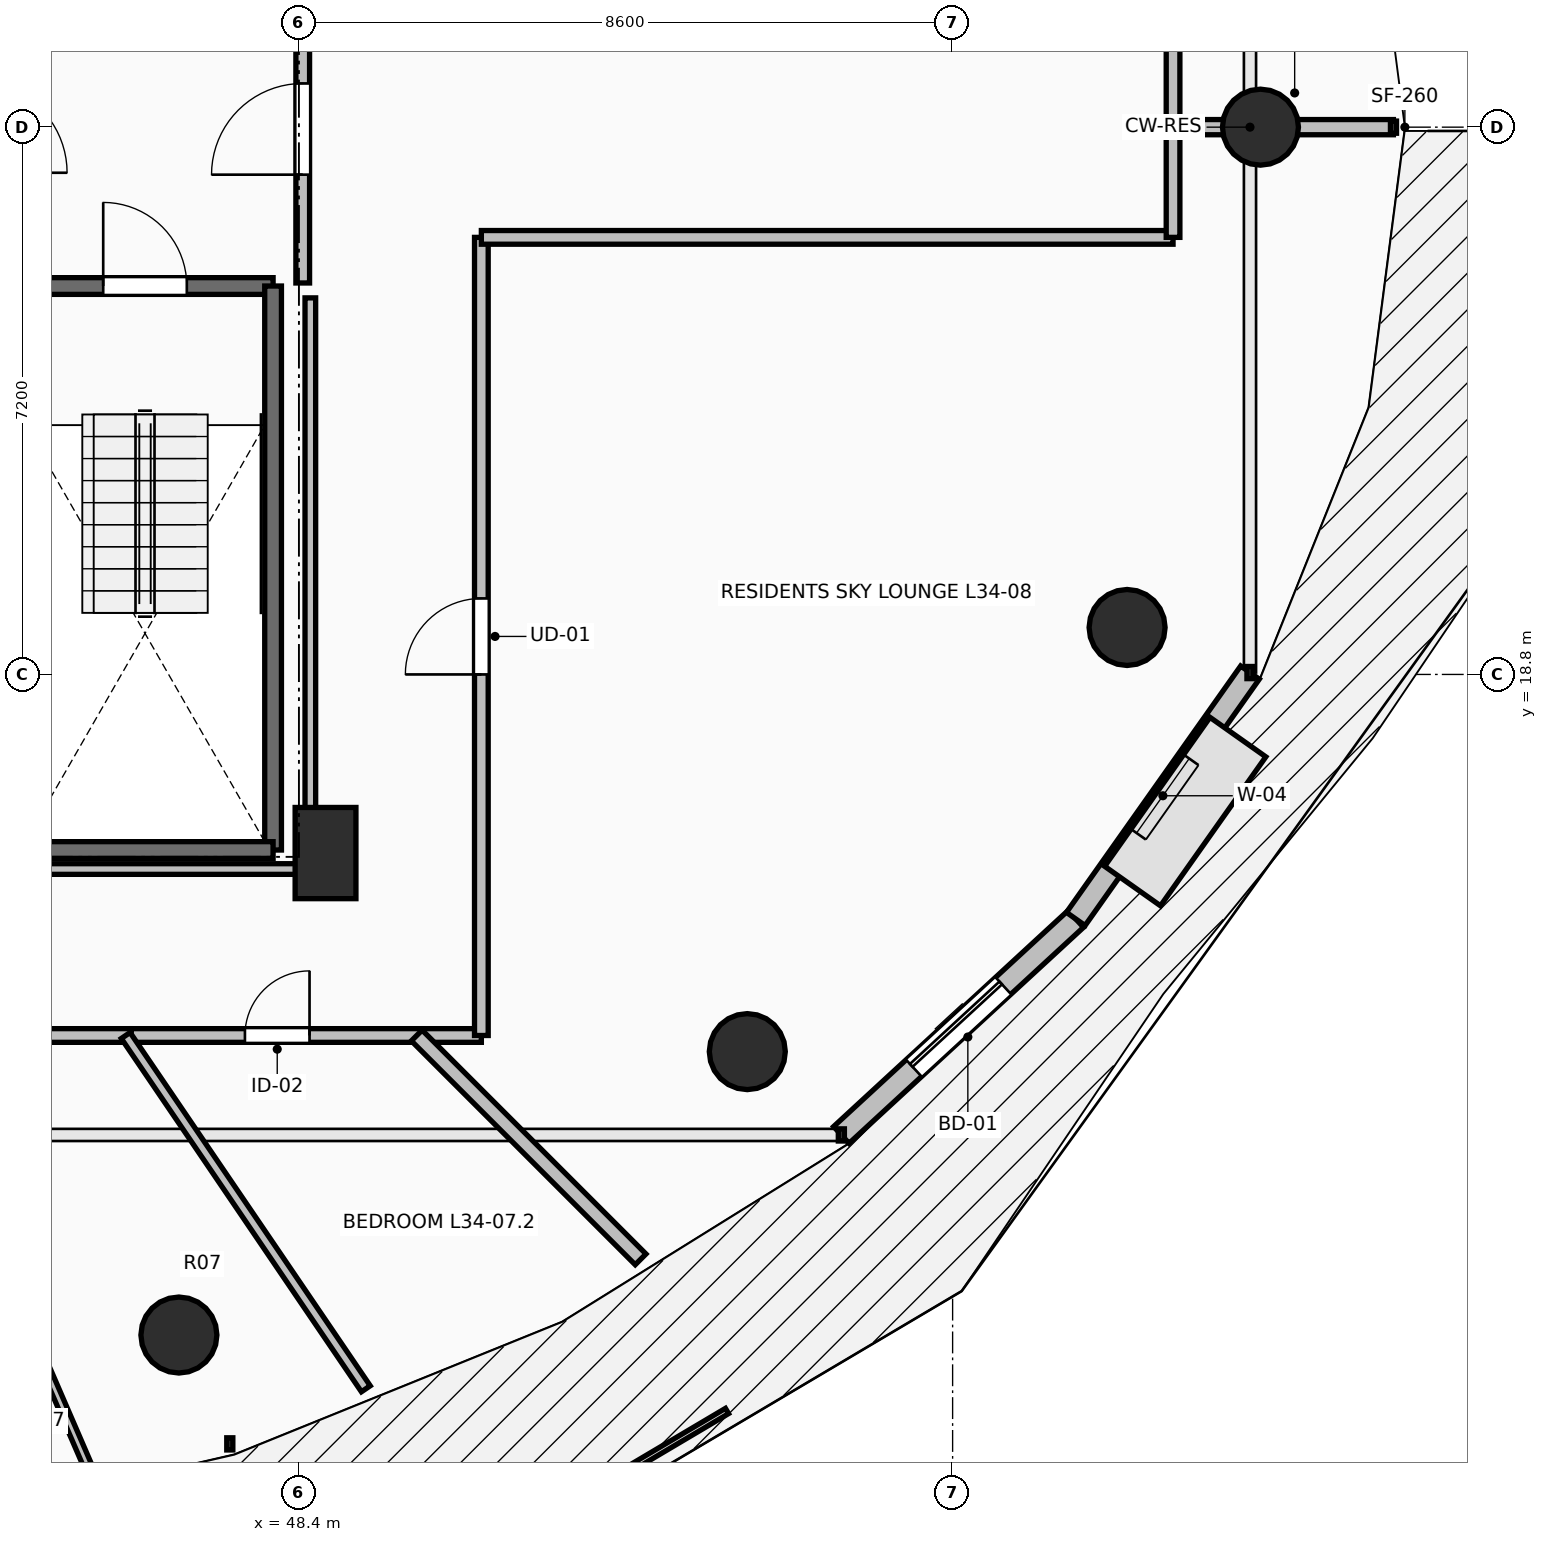
"""IFC4 building model, lengths in metres.
Left out: names, types, materials, properties, quantities, classifications, styles, units other than length and angle.
Written with IfcOpenShell. Run it as: python <this file> out.ifc"""

import sys

from ifc_helpers import new_model, si_unit, direction, frame, frame_2d, origin, origin_2d, place, context, subcontext, project, spatial, rectangle, circle, extrude, element, fill, save


model = new_model("IFC4")
c1 = context("Model", 3, precision=1e-05, world=origin(), true_north=direction((0.0, 1.0)))
c2 = subcontext(c1, "Body", "Model", "MODEL_VIEW")
j1 = project(units=[si_unit("LENGTHUNIT", "METRE"), si_unit("PLANEANGLEUNIT", "RADIAN")], contexts=[c1])
p1 = place(None, origin())
s1 = spatial("IfcSite", under=j1, at=p1, CompositionType="ELEMENT")
p2 = place(p1, origin())
s2 = spatial("IfcBuilding", under=s1, at=p2, CompositionType="ELEMENT")
p3 = place(p2, frame((0.0, 0.0, 129.1)))
s3 = spatial("IfcBuildingStorey", under=s2, at=p3, CompositionType="ELEMENT", Elevation=129.1)
for number, where, z_axis, x_axis in (
    (1, (61.05, 26.0, 0.0), (0.0, 0.0, 1.0), (1.0, 0.0, 0.0)),
    (2, (46.821, 10.109, 0.0), (0.0, 0.0, 1.0), (0.383, -0.924, 0.0)),
    (3, (54.299, 13.838, 0.0), (0.0, 0.0, 1.0), (0.707, -0.707, 0.0)),
    (4, (59.295, 19.418, 0.0), (0.0, 0.0, 1.0), (0.924, -0.383, 0.0)),
):
    element("IfcColumn", number, at=place(p3, frame(where, z_axis=z_axis, x_axis=x_axis)), inside=s3, PredefinedType="COLUMN", context=c2, shape_type="SweptSolid", body=[
        extrude(circle(Radius=0.5, at=origin_2d()), origin(), (0.0, 0.0, 1.0), 3.5),
    ])
p4 = place(p3, frame((48.75, 16.45, 0.0), z_axis=(0.0, 0.0, 1.0), x_axis=(1.0, 0.0, 0.0)))
e5 = element("IfcColumn", 5, at=p4, inside=s3, PredefinedType="PILASTER", context=c2, shape_type="SweptSolid", body=[
    extrude(rectangle(XDim=0.8, YDim=1.2, at=origin_2d()), origin(), (0.0, 0.0, 1.0), 3.5),
])
p5 = place(p3, frame((55.536, 12.742, 0.0), z_axis=(0.0, 0.0, 1.0), x_axis=(0.735477154165, 0.677549522693, 0.0)))
e6 = element("IfcWall", 6, at=p5, inside=s3, PredefinedType="STANDARD", context=c2, shape_type="SweptSolid", body=[
    extrude(rectangle(XDim=4.194, YDim=0.3, at=frame_2d((2.097, 0.0))), origin(), (0.0, 0.0, 1.0), 3.24),
])
p6 = place(p5, frame((1.297, 0.0, 0.0)))
e7 = element("IfcOpeningElement", 7, at=p6, cuts=e6, PredefinedType="OPENING", context=c2, shape_type="SweptSolid", body=[
    extrude(rectangle(XDim=1.6, YDim=2.3, at=frame_2d((0.8, 1.15))), frame((0.0, 0.165, 0.0), z_axis=(0.0, -1.0, 0.0), x_axis=(1.0, 0.0, 0.0)), (0.0, 0.0, 1.0), 0.33),
])
p7 = place(p3, frame((58.62, 15.583, 0.0), z_axis=(0.0, 0.0, 1.0), x_axis=(0.577269753207, 0.816553508371, 0.0)))
e8 = element("IfcWall", 8, at=p7, inside=s3, PredefinedType="STANDARD", context=c2, shape_type="SweptSolid", body=[
    extrude(rectangle(XDim=3.97, YDim=0.3, at=frame_2d((1.985, 0.0))), origin(), (0.0, 0.0, 1.0), 3.24),
])
p8 = place(p7, frame((1.385, 0.0, 0.85)))
e9 = element("IfcOpeningElement", 9, at=p8, cuts=e8, PredefinedType="OPENING", context=c2, shape_type="SweptSolid", body=[
    extrude(rectangle(XDim=1.2, YDim=2.1, at=frame_2d((0.6, 1.05))), frame((0.0, 0.165, 0.0), z_axis=(0.0, -1.0, 0.0), x_axis=(1.0, 0.0, 0.0)), (0.0, 0.0, 1.0), 0.33),
])
p9 = place(p3, frame((44.69, 23.91, 0.0), z_axis=(0.0, 0.0, 1.0), x_axis=(1.0, 0.0, 0.0)))
e10 = element("IfcWall", 10, at=p9, inside=s3, PredefinedType="SOLIDWALL", context=c2, shape_type="SweptSolid", body=[
    extrude(rectangle(XDim=3.37, YDim=0.22, at=frame_2d((1.685, 0.0))), origin(), (0.0, 0.0, 1.0), 3.24),
])
p10 = place(p9, frame((1.135, 0.0, 0.0)))
e11 = element("IfcOpeningElement", 11, at=p10, cuts=e10, PredefinedType="OPENING", context=c2, shape_type="SweptSolid", body=[
    extrude(rectangle(XDim=1.1, YDim=2.15, at=frame_2d((0.55, 1.075))), frame((0.0, 0.125, 0.0), z_axis=(0.0, -1.0, 0.0), x_axis=(1.0, 0.0, 0.0)), (0.0, 0.0, 1.0), 0.25),
])
p11 = place(p3, frame((48.06, 23.91, 0.0), z_axis=(0.0, 0.0, 1.0), x_axis=(0.0, -1.0, 0.0)))
e12 = element("IfcWall", 12, at=p11, inside=s3, PredefinedType="SOLIDWALL", context=c2, shape_type="SweptSolid", body=[
    extrude(rectangle(XDim=7.42, YDim=0.22, at=frame_2d((3.71, 0.0))), origin(), (0.0, 0.0, 1.0), 3.24),
])
p12 = place(p3, frame((48.06, 16.49, 0.0), z_axis=(0.0, 0.0, 1.0), x_axis=(-1.0, 0.0, 0.0)))
e13 = element("IfcWall", 13, at=p12, inside=s3, PredefinedType="SOLIDWALL", context=c2, shape_type="SweptSolid", body=[
    extrude(rectangle(XDim=3.37, YDim=0.22, at=frame_2d((1.685, 0.0))), origin(), (0.0, 0.0, 1.0), 3.24),
])
p13 = place(p3, frame((48.45, 23.95, 0.0), z_axis=(0.0, 0.0, 1.0), x_axis=(0.0, 1.0, 0.0)))
e14 = element("IfcWall", 14, at=p13, inside=s3, PredefinedType="PARTITIONING", context=c2, shape_type="SweptSolid", body=[
    extrude(rectangle(XDim=4.05, YDim=0.18, at=frame_2d((2.025, 0.0))), origin(), (0.0, 0.0, 1.0), 3.24),
])
p14 = place(p13, frame((1.425, 0.0, 0.0)))
e15 = element("IfcOpeningElement", 15, at=p14, cuts=e14, PredefinedType="OPENING", context=c2, shape_type="SweptSolid", body=[
    extrude(rectangle(XDim=1.2, YDim=2.15, at=frame_2d((0.6, 1.075))), frame((0.0, 0.105, 0.0), z_axis=(0.0, -1.0, 0.0), x_axis=(1.0, 0.0, 0.0)), (0.0, 0.0, 1.0), 0.21),
])
p15 = place(p3, frame((59.9, 25.94, 0.0), z_axis=(0.0, 0.0, 1.0), x_axis=(0.0, 1.0, 0.0)))
e16 = element("IfcWall", 16, at=p15, inside=s3, PredefinedType="PARTITIONING", context=c2, shape_type="SweptSolid", body=[
    extrude(rectangle(XDim=1.31, YDim=0.18, at=frame_2d((0.655, 0.0))), origin(), (0.0, 0.0, 1.0), 2.432),
])
p16 = place(p3, frame((43.236, 14.05, 0.0), z_axis=(0.0, 0.0, 1.0), x_axis=(1.0, 0.0, 0.0)))
e17 = element("IfcWall", 17, at=p16, inside=s3, PredefinedType="PARTITIONING", context=c2, shape_type="SweptSolid", body=[
    extrude(rectangle(XDim=2.958, YDim=0.18, at=frame_2d((1.479, 0.0))), origin(), (0.0, 0.0, 1.0), 2.432),
])
p17 = place(p3, frame((46.194, 14.05, 0.0), z_axis=(0.0, 0.0, 1.0), x_axis=(1.0, 0.0, 0.0)))
e18 = element("IfcWall", 18, at=p17, inside=s3, PredefinedType="PARTITIONING", context=c2, shape_type="SweptSolid", body=[
    extrude(rectangle(XDim=3.841, YDim=0.18, at=frame_2d((1.92, 0.0))), origin(), (0.0, 0.0, 1.0), 2.432),
])
p18 = place(p17, frame((1.496, 0.0, 0.0)))
e19 = element("IfcOpeningElement", 19, at=p18, cuts=e18, PredefinedType="OPENING", context=c2, shape_type="SweptSolid", body=[
    extrude(rectangle(XDim=0.85, YDim=2.1, at=frame_2d((0.425, 1.05))), frame((0.0, 0.105, 0.0), z_axis=(0.0, -1.0, 0.0), x_axis=(1.0, 0.0, 0.0)), (0.0, 0.0, 1.0), 0.21),
])
p19 = place(p3, frame((50.035, 14.05, 0.0), z_axis=(0.0, 0.0, 1.0), x_axis=(1.0, 0.0, 0.0)))
e20 = element("IfcWall", 20, at=p19, inside=s3, PredefinedType="PARTITIONING", context=c2, shape_type="SweptSolid", body=[
    extrude(rectangle(XDim=0.765, YDim=0.18, at=frame_2d((0.383, 0.0))), origin(), (0.0, 0.0, 1.0), 2.874),
])
p20 = place(p3, frame((50.8, 14.05, 0.0), z_axis=(0.0, 0.0, 1.0), x_axis=(0.0, 1.0, 0.0)))
e21 = element("IfcWall", 21, at=p20, inside=s3, PredefinedType="PARTITIONING", context=c2, shape_type="SweptSolid", body=[
    extrude(rectangle(XDim=10.5, YDim=0.18, at=frame_2d((5.25, 0.0))), origin(), (0.0, 0.0, 1.0), 2.432),
])
p21 = place(p20, frame((4.75, 0.0, 0.0)))
e22 = element("IfcOpeningElement", 22, at=p21, cuts=e21, PredefinedType="OPENING", context=c2, shape_type="SweptSolid", body=[
    extrude(rectangle(XDim=1.0, YDim=2.15, at=frame_2d((0.5, 1.075))), frame((0.0, 0.105, 0.0), z_axis=(0.0, -1.0, 0.0), x_axis=(1.0, 0.0, 0.0)), (0.0, 0.0, 1.0), 0.21),
])
p22 = place(p3, frame((50.8, 24.55, 0.0), z_axis=(0.0, 0.0, 1.0), x_axis=(1.0, 0.0, 0.0)))
e23 = element("IfcWall", 23, at=p22, inside=s3, PredefinedType="PARTITIONING", context=c2, shape_type="SweptSolid", body=[
    extrude(rectangle(XDim=9.1, YDim=0.18, at=frame_2d((4.55, 0.0))), origin(), (0.0, 0.0, 1.0), 2.432),
])
p23 = place(p3, frame((59.9, 24.55, 0.0), z_axis=(0.0, 0.0, 1.0), x_axis=(0.0, 1.0, 0.0)))
e24 = element("IfcWall", 24, at=p23, inside=s3, PredefinedType="PARTITIONING", context=c2, shape_type="SweptSolid", body=[
    extrude(rectangle(XDim=1.39, YDim=0.18, at=frame_2d((0.695, 0.0))), origin(), (0.0, 0.0, 1.0), 2.432),
])
p24 = place(p3, frame((59.9, 26.0, 0.0), z_axis=(0.0, 0.0, 1.0), x_axis=(1.0, 0.0, 0.0)))
e25 = element("IfcWall", 25, at=p24, inside=s3, PredefinedType="PARTITIONING", context=c2, shape_type="SweptSolid", body=[
    extrude(rectangle(XDim=2.899, YDim=0.2, at=frame_2d((1.45, 0.0))), origin(), (0.0, 0.0, 1.0), 2.432),
])
p25 = place(p3, frame((45.732, 8.134, 0.0), z_axis=(0.0, 0.0, 1.0), x_axis=(-0.397125966554, 0.91776411277, 0.0)))
e26 = element("IfcWall", 26, at=p25, inside=s3, PredefinedType="PARTITIONING", context=c2, shape_type="SweptSolid", body=[
    extrude(rectangle(XDim=2.277, YDim=0.11, at=frame_2d((1.139, 0.0))), origin(), (0.0, 0.0, 1.0), 2.728),
])
p26 = place(p3, frame((49.28, 9.402, 0.0), z_axis=(0.0, 0.0, 1.0), x_axis=(-0.562106811751, 0.827064648128, 0.0)))
e27 = element("IfcWall", 27, at=p26, inside=s3, PredefinedType="PARTITIONING", context=c2, shape_type="SweptSolid", body=[
    extrude(rectangle(XDim=5.62, YDim=0.14, at=frame_2d((2.81, 0.0))), origin(), (0.0, 0.0, 1.0), 2.432),
])
p27 = place(p3, frame((52.895, 11.105, 0.0), z_axis=(0.0, 0.0, 1.0), x_axis=(-0.707106781187, 0.707106781187, 0.0)))
e28 = element("IfcWall", 28, at=p27, inside=s3, PredefinedType="PARTITIONING", context=c2, shape_type="SweptSolid", body=[
    extrude(rectangle(XDim=4.165, YDim=0.2, at=frame_2d((2.083, 0.0))), origin(), (0.0, 0.0, 1.0), 2.728),
])
p28 = place(p3, frame((44.805, 16.24, 0.0), z_axis=(0.0, 0.0, 1.0), x_axis=(1.0, 0.0, 0.0)))
e29 = element("IfcWall", 29, at=p28, inside=s3, PredefinedType="PARTITIONING", context=c2, shape_type="SweptSolid", body=[
    extrude(rectangle(XDim=3.745, YDim=0.14, at=frame_2d((1.873, 0.0))), origin(), (0.0, 0.0, 1.0), 2.432),
])
p29 = place(p3, frame((48.55, 16.24, 0.0), z_axis=(0.0, 0.0, 1.0), x_axis=(0.0, 1.0, 0.0)))
e30 = element("IfcWall", 30, at=p29, inside=s3, PredefinedType="PARTITIONING", context=c2, shape_type="SweptSolid", body=[
    extrude(rectangle(XDim=7.514, YDim=0.14, at=frame_2d((3.757, 0.0))), origin(), (0.0, 0.0, 1.0), 2.432),
])
p30 = place(p6, origin())
e31 = element("IfcDoor", 31, at=p30, inside=s3, OperationType="SLIDING_TO_LEFT", PredefinedType="DOOR", context=c2, shape_type="SweptSolid", body=[
    extrude(rectangle(XDim=1.6, YDim=2.3, at=frame_2d((0.8, 1.15))), frame((0.0, 0.025, 0.0), z_axis=(0.0, -1.0, 0.0), x_axis=(1.0, 0.0, 0.0)), (0.0, 0.0, 1.0), 0.05),
])
fill(e7, e31)
p31 = place(p8, origin())
e32 = element("IfcWindow", 32, at=p31, inside=s3, PartitioningType="SINGLE_PANEL", PredefinedType="WINDOW", context=c2, shape_type="SweptSolid", body=[
    extrude(rectangle(XDim=1.2, YDim=2.1, at=frame_2d((0.6, 1.05))), frame((0.0, 0.03, 0.0), z_axis=(0.0, -1.0, 0.0), x_axis=(1.0, 0.0, 0.0)), (0.0, 0.0, 1.0), 0.06),
])
fill(e9, e32)
p32 = place(p10, origin())
e33 = element("IfcDoor", 33, at=p32, inside=s3, OperationType="SINGLE_SWING_LEFT", PredefinedType="DOOR", context=c2, shape_type="SweptSolid", body=[
    extrude(rectangle(XDim=1.1, YDim=2.15, at=frame_2d((0.55, 1.075))), frame((0.0, 0.025, 0.0), z_axis=(0.0, -1.0, 0.0), x_axis=(1.0, 0.0, 0.0)), (0.0, 0.0, 1.0), 0.05),
])
fill(e11, e33)
p33 = place(p14, origin())
e34 = element("IfcDoor", 34, at=p33, inside=s3, OperationType="SINGLE_SWING_LEFT", PredefinedType="DOOR", context=c2, shape_type="SweptSolid", body=[
    extrude(rectangle(XDim=1.2, YDim=2.15, at=frame_2d((0.6, 1.075))), frame((0.0, 0.025, 0.0), z_axis=(0.0, -1.0, 0.0), x_axis=(1.0, 0.0, 0.0)), (0.0, 0.0, 1.0), 0.05),
])
fill(e15, e34)
p34 = place(p21, origin())
e35 = element("IfcDoor", 35, at=p34, inside=s3, OperationType="SINGLE_SWING_LEFT", PredefinedType="DOOR", context=c2, shape_type="SweptSolid", body=[
    extrude(rectangle(XDim=1.0, YDim=2.15, at=frame_2d((0.5, 1.075))), frame((0.0, 0.025, 0.0), z_axis=(0.0, -1.0, 0.0), x_axis=(1.0, 0.0, 0.0)), (0.0, 0.0, 1.0), 0.05),
])
fill(e22, e35)
p35 = place(p18, origin())
e36 = element("IfcDoor", 36, at=p35, inside=s3, OperationType="SINGLE_SWING_RIGHT", PredefinedType="DOOR", context=c2, shape_type="SweptSolid", body=[
    extrude(rectangle(XDim=0.85, YDim=2.1, at=frame_2d((0.425, 1.05))), frame((0.0, 0.025, 0.0), z_axis=(0.0, -1.0, 0.0), x_axis=(1.0, 0.0, 0.0)), (0.0, 0.0, 1.0), 0.05),
])
fill(e19, e36)
save(model, sys.argv[1])
